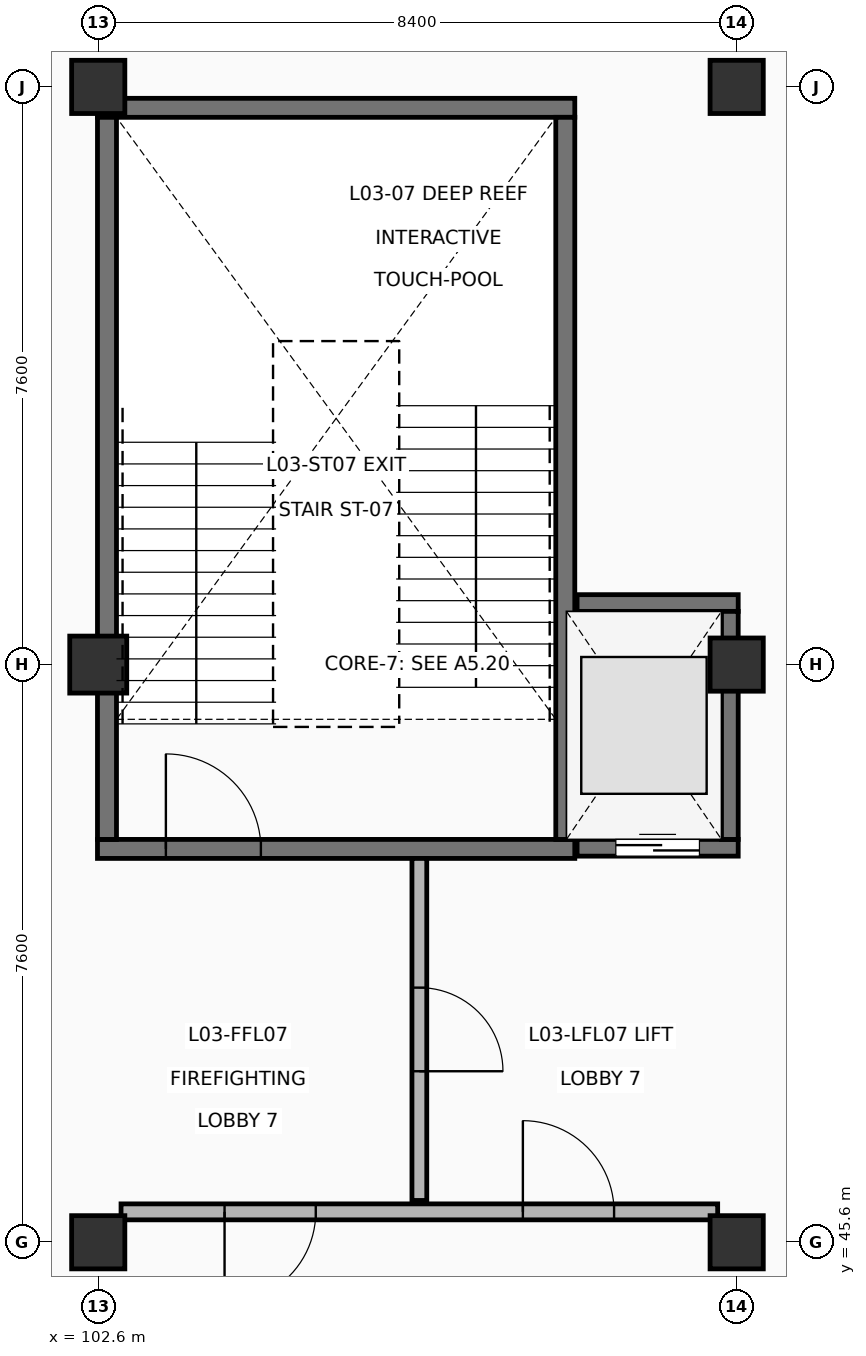
"""IFC4 building model, lengths in metres.
Left out: names, types, materials, properties, quantities, classifications, styles, units other than length and angle.
Written with IfcOpenShell. Run it as: python <this file> out.ifc"""

import sys

from ifc_helpers import new_model, si_unit, direction, frame, frame_2d, origin, origin_2d, place, context, subcontext, project, spatial, rectangle, circle, extrude, element, fill, save


model = new_model("IFC4")
c1 = context("Model", 3, precision=1e-05, world=origin(), true_north=direction((0.0, 1.0)))
c2 = subcontext(c1, "Body", "Model", "MODEL_VIEW")
j1 = project(units=[si_unit("LENGTHUNIT", "METRE"), si_unit("PLANEANGLEUNIT", "RADIAN")], contexts=[c1])
p1 = place(None, origin())
s1 = spatial("IfcSite", under=j1, at=p1, CompositionType="ELEMENT")
p2 = place(p1, origin())
s2 = spatial("IfcBuilding", under=s1, at=p2, CompositionType="ELEMENT")
p3 = place(p2, frame((0.0, 0.0, 10.5)))
s3 = spatial("IfcBuildingStorey", under=s2, at=p3, CompositionType="ELEMENT", Elevation=10.5)
p4 = place(p3, frame((102.6, 45.6, 0.0), z_axis=(0.0, 0.0, 1.0), x_axis=(1.0, 0.0, 0.0)))
e1 = element("IfcColumn", 1, at=p4, inside=s3, PredefinedType="COLUMN", context=c2, shape_type="SweptSolid", body=[
    extrude(rectangle(XDim=0.7, YDim=0.7, at=origin_2d()), origin(), (0.0, 0.0, 1.0), 4.8),
])
p5 = place(p3, frame((102.6, 53.2, 0.0), z_axis=(0.0, 0.0, 1.0), x_axis=(1.0, 0.0, 0.0)))
e2 = element("IfcColumn", 2, at=p5, inside=s3, PredefinedType="COLUMN", context=c2, shape_type="SweptSolid", body=[
    extrude(circle(Radius=0.375, at=origin_2d()), origin(), (0.0, 0.0, 1.0), 4.8),
])
for number, where, z_axis, x_axis in (
    (3, (102.6, 60.8, 0.0), (0.0, 0.0, 1.0), (1.0, 0.0, 0.0)),
    (4, (111.0, 45.6, 0.0), (0.0, 0.0, 1.0), (1.0, 0.0, 0.0)),
    (5, (111.0, 53.2, 0.0), (0.0, 0.0, 1.0), (1.0, 0.0, 0.0)),
    (6, (111.0, 60.8, 0.0), (0.0, 0.0, 1.0), (1.0, 0.0, 0.0)),
):
    element("IfcColumn", number, at=place(p3, frame(where, z_axis=z_axis, x_axis=x_axis)), inside=s3, PredefinedType="COLUMN", context=c2, shape_type="SweptSolid", body=[
        extrude(rectangle(XDim=0.7, YDim=0.7, at=origin_2d()), origin(), (0.0, 0.0, 1.0), 4.8),
    ])
p6 = place(p3, frame((102.59, 50.775, 0.0), z_axis=(0.0, 0.0, 1.0), x_axis=(1.0, 0.0, 0.0)))
e7 = element("IfcWall", 7, at=p6, inside=s3, PredefinedType="SHEAR", context=c2, shape_type="SweptSolid", body=[
    extrude(rectangle(XDim=6.28, YDim=0.25, at=frame_2d((3.14, 0.0))), origin(), (0.0, 0.0, 1.0), 4.575),
])
p7 = place(p6, frame((0.9, 0.0, 0.0)))
e8 = element("IfcOpeningElement", 8, at=p7, cuts=e7, PredefinedType="OPENING", context=c2, shape_type="SweptSolid", body=[
    extrude(rectangle(XDim=1.25, YDim=2.2, at=frame_2d((0.625, 1.1))), frame((0.0, 0.135, 0.0), z_axis=(0.0, -1.0, 0.0), x_axis=(1.0, 0.0, 0.0)), (0.0, 0.0, 1.0), 0.27),
])
p8 = place(p3, frame((102.59, 60.525, 0.0), z_axis=(0.0, 0.0, 1.0), x_axis=(1.0, 0.0, 0.0)))
e9 = element("IfcWall", 9, at=p8, inside=s3, PredefinedType="SHEAR", context=c2, shape_type="SweptSolid", body=[
    extrude(rectangle(XDim=6.28, YDim=0.25, at=frame_2d((3.14, 0.0))), origin(), (0.0, 0.0, 1.0), 4.575),
])
for number, where, z_axis, x_axis in (
    (10, (102.715, 50.9, 0.0), (0.0, 0.0, 1.0), (0.0, 1.0, 0.0)),
    (11, (108.745, 50.9, 0.0), (0.0, 0.0, 1.0), (0.0, 1.0, 0.0)),
):
    element("IfcWall", number, at=place(p3, frame(where, z_axis=z_axis, x_axis=x_axis)), inside=s3, PredefinedType="SHEAR", context=c2, shape_type="SweptSolid", body=[
        extrude(rectangle(XDim=9.5, YDim=0.25, at=frame_2d((4.75, 0.0))), origin(), (0.0, 0.0, 1.0), 4.575),
    ])
p9 = place(p3, frame((108.9, 50.79, 0.0), z_axis=(0.0, 0.0, 1.0), x_axis=(1.0, 0.0, 0.0)))
e12 = element("IfcWall", 12, at=p9, inside=s3, PredefinedType="SHEAR", context=c2, shape_type="SweptSolid", body=[
    extrude(rectangle(XDim=2.12, YDim=0.22, at=frame_2d((1.06, 0.0))), origin(), (0.0, 0.0, 1.0), 4.575),
])
p10 = place(p9, frame((0.51, 0.0, 0.0)))
e13 = element("IfcOpeningElement", 13, at=p10, cuts=e12, PredefinedType="OPENING", context=c2, shape_type="SweptSolid", body=[
    extrude(rectangle(XDim=1.1, YDim=2.15, at=frame_2d((0.55, 1.075))), frame((0.0, 0.12, 0.0), z_axis=(0.0, -1.0, 0.0), x_axis=(1.0, 0.0, 0.0)), (0.0, 0.0, 1.0), 0.24),
])
p11 = place(p3, frame((108.9, 54.01, 0.0), z_axis=(0.0, 0.0, 1.0), x_axis=(1.0, 0.0, 0.0)))
e14 = element("IfcWall", 14, at=p11, inside=s3, PredefinedType="SHEAR", context=c2, shape_type="SweptSolid", body=[
    extrude(rectangle(XDim=2.12, YDim=0.22, at=frame_2d((1.06, 0.0))), origin(), (0.0, 0.0, 1.0), 4.575),
])
p12 = place(p3, frame((110.91, 50.9, 0.0), z_axis=(0.0, 0.0, 1.0), x_axis=(0.0, 1.0, 0.0)))
e15 = element("IfcWall", 15, at=p12, inside=s3, PredefinedType="SHEAR", context=c2, shape_type="SweptSolid", body=[
    extrude(rectangle(XDim=3.0, YDim=0.22, at=frame_2d((1.5, 0.0))), origin(), (0.0, 0.0, 1.0), 4.575),
])
p13 = place(p3, frame((102.9, 46.0, 0.0), z_axis=(0.0, 0.0, 1.0), x_axis=(1.0, 0.0, 0.0)))
e16 = element("IfcWall", 16, at=p13, inside=s3, PredefinedType="PARTITIONING", context=c2, shape_type="SweptSolid", body=[
    extrude(rectangle(XDim=7.85, YDim=0.21, at=frame_2d((3.925, 0.0))), origin(), (0.0, 0.0, 1.0), 4.575),
])
p14 = place(p13, frame((1.362, 0.0, 0.0)))
e17 = element("IfcOpeningElement", 17, at=p14, cuts=e16, PredefinedType="OPENING", context=c2, shape_type="SweptSolid", body=[
    extrude(rectangle(XDim=1.2, YDim=2.2, at=frame_2d((0.6, 1.1))), frame((0.0, 0.115, 0.0), z_axis=(0.0, -1.0, 0.0), x_axis=(1.0, 0.0, 0.0)), (0.0, 0.0, 1.0), 0.23),
])
p15 = place(p13, frame((5.287, 0.0, 0.0)))
e18 = element("IfcOpeningElement", 18, at=p15, cuts=e16, PredefinedType="OPENING", context=c2, shape_type="SweptSolid", body=[
    extrude(rectangle(XDim=1.2, YDim=2.2, at=frame_2d((0.6, 1.1))), frame((0.0, 0.115, 0.0), z_axis=(0.0, -1.0, 0.0), x_axis=(1.0, 0.0, 0.0)), (0.0, 0.0, 1.0), 0.23),
])
p16 = place(p3, frame((106.825, 46.15, 0.0), z_axis=(0.0, 0.0, 1.0), x_axis=(0.0, 1.0, 0.0)))
e19 = element("IfcWall", 19, at=p16, inside=s3, PredefinedType="PARTITIONING", context=c2, shape_type="SweptSolid", body=[
    extrude(rectangle(XDim=4.5, YDim=0.195, at=frame_2d((2.25, 0.0))), origin(), (0.0, 0.0, 1.0), 4.575),
])
p17 = place(p16, frame((1.7, 0.0, 0.0)))
e20 = element("IfcOpeningElement", 20, at=p17, cuts=e19, PredefinedType="OPENING", context=c2, shape_type="SweptSolid", body=[
    extrude(rectangle(XDim=1.1, YDim=2.15, at=frame_2d((0.55, 1.075))), frame((0.0, 0.107, 0.0), z_axis=(0.0, -1.0, 0.0), x_axis=(1.0, 0.0, 0.0)), (0.0, 0.0, 1.0), 0.215),
])
p18 = place(p7, origin())
e21 = element("IfcDoor", 21, at=p18, inside=s3, OperationType="SINGLE_SWING_LEFT", PredefinedType="DOOR", context=c2, shape_type="SweptSolid", body=[
    extrude(rectangle(XDim=1.25, YDim=2.2, at=frame_2d((0.625, 1.1))), frame((0.0, 0.025, 0.0), z_axis=(0.0, -1.0, 0.0), x_axis=(1.0, 0.0, 0.0)), (0.0, 0.0, 1.0), 0.05),
])
fill(e8, e21)
p19 = place(p10, origin())
e22 = element("IfcDoor", 22, at=p19, inside=s3, OperationType="DOUBLE_DOOR_SLIDING", PredefinedType="DOOR", context=c2, shape_type="SweptSolid", body=[
    extrude(rectangle(XDim=1.1, YDim=2.15, at=frame_2d((0.55, 1.075))), frame((0.0, 0.025, 0.0), z_axis=(0.0, -1.0, 0.0), x_axis=(1.0, 0.0, 0.0)), (0.0, 0.0, 1.0), 0.05),
])
fill(e13, e22)
p20 = place(p14, origin())
e23 = element("IfcDoor", 23, at=p20, inside=s3, OperationType="SINGLE_SWING_RIGHT", PredefinedType="DOOR", context=c2, shape_type="SweptSolid", body=[
    extrude(rectangle(XDim=1.2, YDim=2.2, at=frame_2d((0.6, 1.1))), frame((0.0, 0.025, 0.0), z_axis=(0.0, -1.0, 0.0), x_axis=(1.0, 0.0, 0.0)), (0.0, 0.0, 1.0), 0.05),
])
fill(e17, e23)
p21 = place(p15, origin())
e24 = element("IfcDoor", 24, at=p21, inside=s3, OperationType="SINGLE_SWING_LEFT", PredefinedType="DOOR", context=c2, shape_type="SweptSolid", body=[
    extrude(rectangle(XDim=1.2, YDim=2.2, at=frame_2d((0.6, 1.1))), frame((0.0, 0.025, 0.0), z_axis=(0.0, -1.0, 0.0), x_axis=(1.0, 0.0, 0.0)), (0.0, 0.0, 1.0), 0.05),
])
fill(e18, e24)
p22 = place(p17, origin())
e25 = element("IfcDoor", 25, at=p22, inside=s3, OperationType="SINGLE_SWING_RIGHT", PredefinedType="DOOR", context=c2, shape_type="SweptSolid", body=[
    extrude(rectangle(XDim=1.1, YDim=2.15, at=frame_2d((0.55, 1.075))), frame((0.0, 0.025, 0.0), z_axis=(0.0, -1.0, 0.0), x_axis=(1.0, 0.0, 0.0)), (0.0, 0.0, 1.0), 0.05),
])
fill(e20, e25)
save(model, sys.argv[1])
